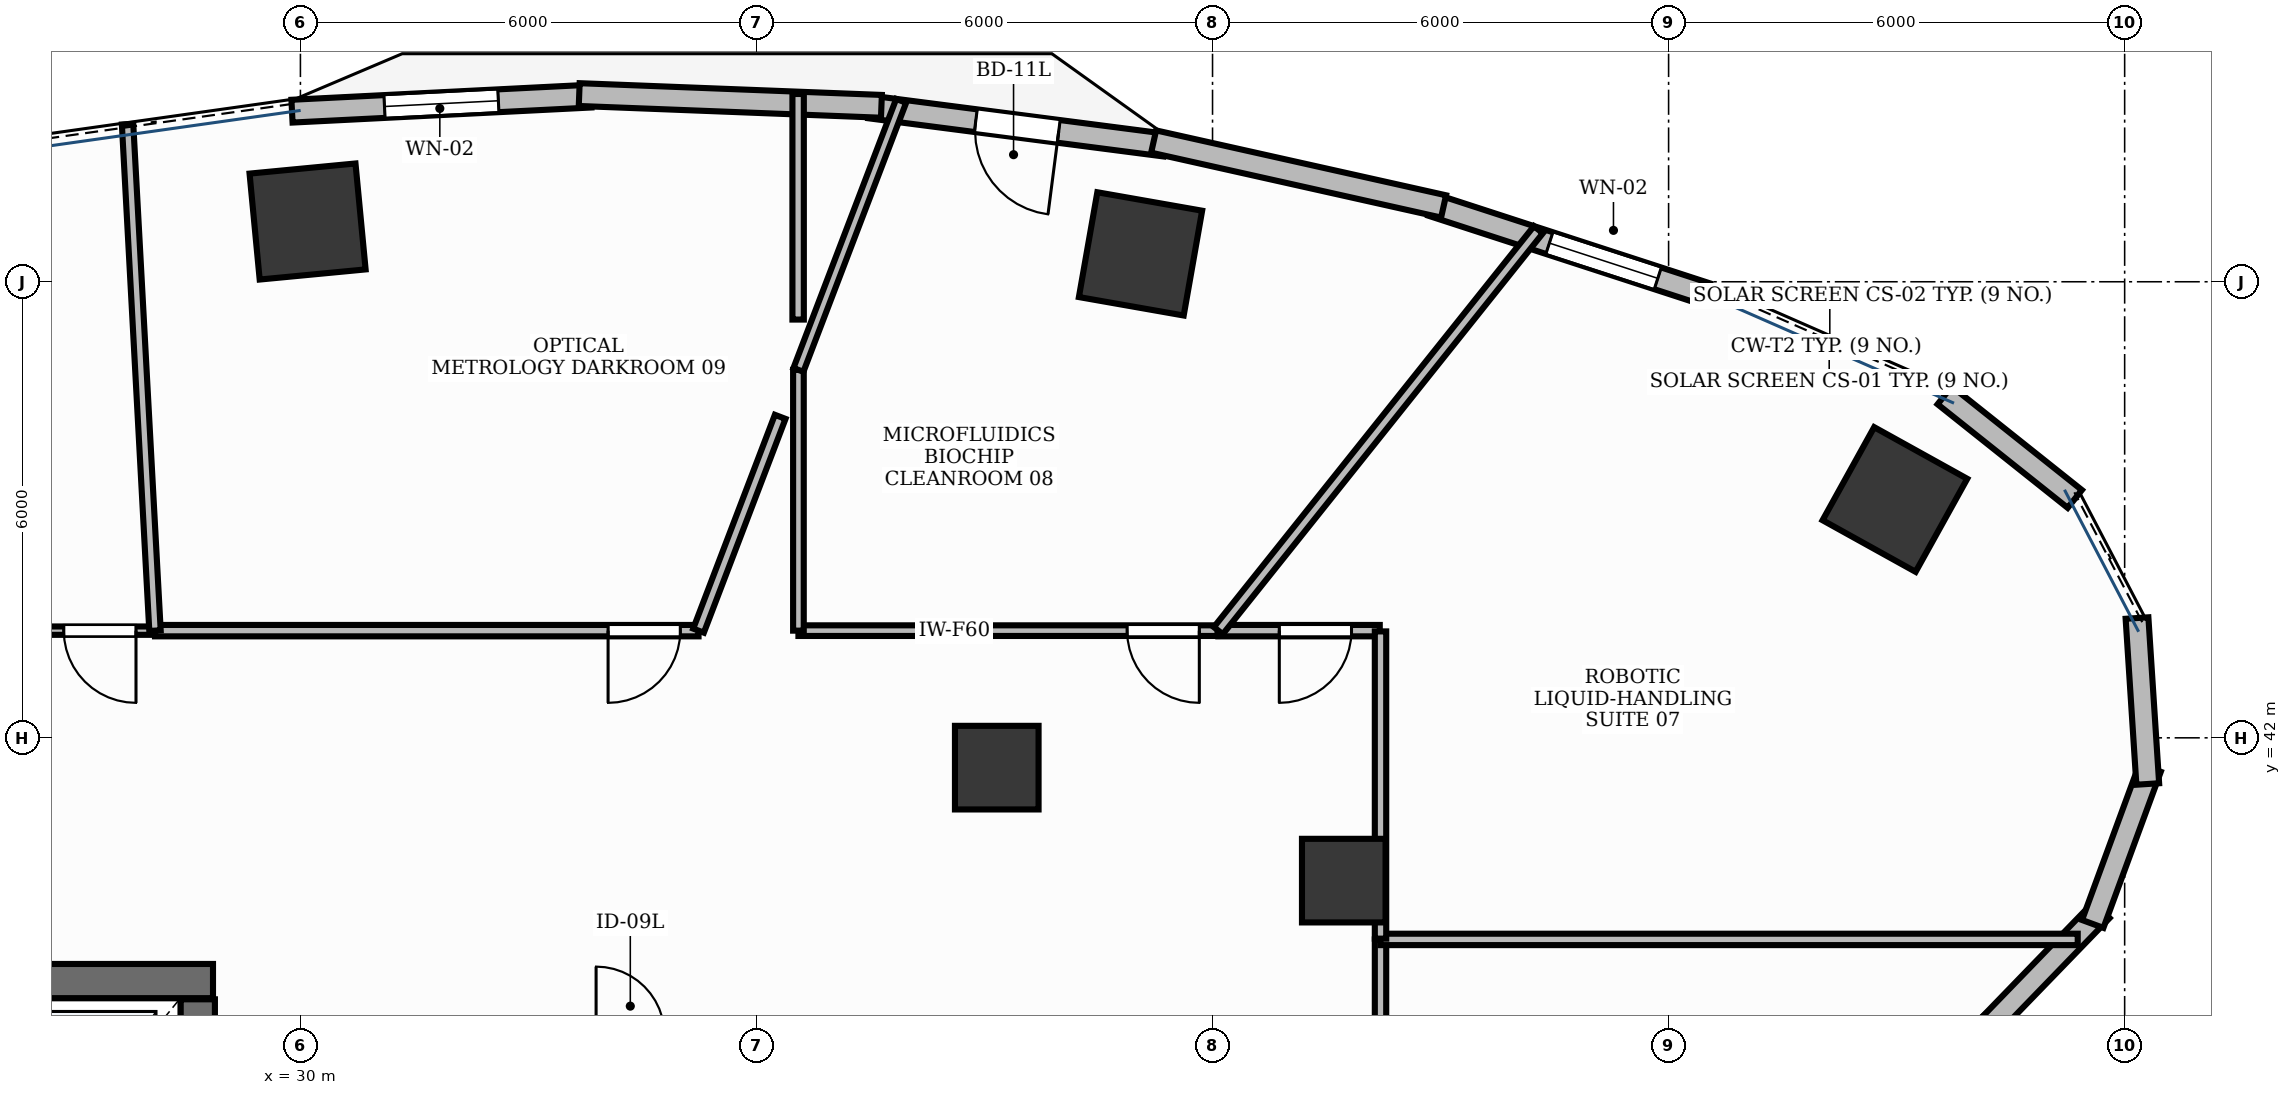
"""IFC4 building model, lengths in metres.
Left out: names, types, materials, properties, quantities, classifications, styles, units other than length and angle.
Written with IfcOpenShell. Run it as: python <this file> out.ifc"""

import sys

from ifc_helpers import new_model, si_unit, direction, frame, frame_2d, origin, origin_2d, place, context, subcontext, project, spatial, rectangle, extrude, element, fill, save


model = new_model("IFC4")
c1 = context("Model", 3, precision=1e-05, world=origin(), true_north=direction((0.0, 1.0)))
c2 = subcontext(c1, "Body", "Model", "MODEL_VIEW")
j1 = project(units=[si_unit("LENGTHUNIT", "METRE"), si_unit("PLANEANGLEUNIT", "RADIAN")], contexts=[c1])
p1 = place(None, origin())
s1 = spatial("IfcSite", under=j1, at=p1, CompositionType="ELEMENT")
p2 = place(p1, origin())
s2 = spatial("IfcBuilding", under=s1, at=p2, CompositionType="ELEMENT")
p3 = place(p2, frame((0.0, 0.0, 46.8)))
s3 = spatial("IfcBuildingStorey", under=s2, at=p3, CompositionType="ELEMENT", Elevation=46.8)
p4 = place(p3, frame((25.75, 38.8, 0.0), z_axis=(0.0, 0.0, 1.0), x_axis=(1.0, 0.0, 0.0)))
e1 = element("IfcWall", 1, at=p4, inside=s3, PredefinedType="SHEAR", context=c2, shape_type="SweptSolid", body=[
    extrude(rectangle(XDim=3.1, YDim=0.45, at=frame_2d((1.55, 0.0))), origin(), (0.0, 0.0, 1.0), 3.9),
])
p5 = place(p3, frame((28.65, 35.86, 0.0), z_axis=(0.0, 0.0, 1.0), x_axis=(0.0, 1.0, 0.0)))
e2 = element("IfcWall", 2, at=p5, inside=s3, PredefinedType="SHEAR", context=c2, shape_type="SweptSolid", body=[
    extrude(rectangle(XDim=2.7, YDim=0.45, at=frame_2d((1.35, 0.0))), origin(), (0.0, 0.0, 1.0), 3.9),
])
p6 = place(p3, frame((50.977, 45.135, -0.0), z_axis=(0.0, 0.0, 1.0), x_axis=(-0.874535078577, 0.484962262797, 0.0)))
e3 = element("IfcColumn", 3, at=p6, inside=s3, PredefinedType="COLUMN", context=c2, shape_type="SweptSolid", body=[
    extrude(rectangle(XDim=1.4, YDim=1.4, at=origin_2d()), origin(), (0.0, 0.0, 1.0), 3.901),
])
p7 = place(p3, frame((43.727, 40.121, -0.0), z_axis=(0.0, 0.0, 1.0), x_axis=(1.0, 0.0, 0.0)))
e4 = element("IfcColumn", 4, at=p7, inside=s3, PredefinedType="COLUMN", context=c2, shape_type="SweptSolid", body=[
    extrude(rectangle(XDim=1.1, YDim=1.1, at=origin_2d()), origin(), (0.0, 0.0, 1.0), 3.901),
])
p8 = place(p3, frame((41.052, 48.367, -0.0), z_axis=(0.0, 0.0, 1.0), x_axis=(-0.984868307662, 0.173304404339, 0.0)))
e5 = element("IfcColumn", 5, at=p8, inside=s3, PredefinedType="COLUMN", context=c2, shape_type="SweptSolid", body=[
    extrude(rectangle(XDim=1.4, YDim=1.4, at=origin_2d()), origin(), (0.0, 0.0, 1.0), 3.901),
])
p9 = place(p3, frame((39.161, 41.608, -0.0), z_axis=(0.0, 0.0, 1.0), x_axis=(1.0, 0.0, 0.0)))
e6 = element("IfcColumn", 6, at=p9, inside=s3, PredefinedType="COLUMN", context=c2, shape_type="SweptSolid", body=[
    extrude(rectangle(XDim=1.1, YDim=1.1, at=origin_2d()), origin(), (0.0, 0.0, 1.0), 3.901),
])
p10 = place(p3, frame((30.094, 48.792, -0.0), z_axis=(0.0, 0.0, 1.0), x_axis=(0.995462868748, 0.095150811579, 0.0)))
e7 = element("IfcColumn", 7, at=p10, inside=s3, PredefinedType="COLUMN", context=c2, shape_type="SweptSolid", body=[
    extrude(rectangle(XDim=1.4, YDim=1.4, at=origin_2d()), origin(), (0.0, 0.0, 1.0), 3.901),
])
p11 = place(p3, frame((48.5, 47.836, 0.0), z_axis=(0.0, 0.0, 1.0), x_axis=(-0.950958033078, 0.30931993037, 0.0)))
e8 = element("IfcWall", 8, at=p11, inside=s3, PredefinedType="STANDARD", context=c2, shape_type="SweptSolid", body=[
    extrude(rectangle(XDim=3.8, YDim=0.3, at=frame_2d((1.9, 0.0))), origin(), (0.0, 0.0, 1.0), 3.9),
])
p12 = place(p11, frame((0.675, 0.0, 0.95)))
e9 = element("IfcOpeningElement", 9, at=p12, cuts=e8, PredefinedType="OPENING", context=c2, shape_type="SweptSolid", body=[
    extrude(rectangle(XDim=1.5, YDim=1.8, at=frame_2d((0.75, 0.9))), frame((0.0, 0.165, 0.0), z_axis=(0.0, -1.0, 0.0), x_axis=(1.0, 0.0, 0.0)), (0.0, 0.0, 1.0), 0.33),
])
p13 = place(p3, frame((41.373, 49.798, 0.0), z_axis=(0.0, 0.0, 1.0), x_axis=(-0.991741322416, 0.128254237408, 0.0)))
e10 = element("IfcWall", 10, at=p13, inside=s3, PredefinedType="STANDARD", context=c2, shape_type="SweptSolid", body=[
    extrude(rectangle(XDim=3.916, YDim=0.3, at=frame_2d((1.958, 0.0))), origin(), (0.0, 0.0, 1.0), 3.9),
])
p14 = place(p13, frame((1.408, 0.0, 0.0)))
e11 = element("IfcOpeningElement", 11, at=p14, cuts=e10, PredefinedType="OPENING", context=c2, shape_type="SweptSolid", body=[
    extrude(rectangle(XDim=1.1, YDim=2.15, at=frame_2d((0.55, 1.075))), frame((0.0, 0.165, 0.0), z_axis=(0.0, -1.0, 0.0), x_axis=(1.0, 0.0, 0.0)), (0.0, 0.0, 1.0), 0.33),
])
p15 = place(p3, frame((33.821, 50.442, 0.0), z_axis=(0.0, 0.0, 1.0), x_axis=(-0.99873153138, -0.050352042933, 0.0)))
e12 = element("IfcWall", 12, at=p15, inside=s3, PredefinedType="STANDARD", context=c2, shape_type="SweptSolid", body=[
    extrude(rectangle(XDim=3.937, YDim=0.3, at=frame_2d((1.969, 0.0))), origin(), (0.0, 0.0, 1.0), 3.9),
])
p16 = place(p15, frame((1.219, 0.0, 0.95)))
e13 = element("IfcOpeningElement", 13, at=p16, cuts=e12, PredefinedType="OPENING", context=c2, shape_type="SweptSolid", body=[
    extrude(rectangle(XDim=1.5, YDim=1.8, at=frame_2d((0.75, 0.9))), frame((0.0, 0.165, 0.0), z_axis=(0.0, -1.0, 0.0), x_axis=(1.0, 0.0, 0.0)), (0.0, 0.0, 1.0), 0.33),
])
p17 = place(p3, frame((45.04, 48.991, 0.0), z_axis=(0.0, 0.0, 1.0), x_axis=(-0.975868573345, 0.218358713032, 0.0)))
e14 = element("IfcWall", 14, at=p17, inside=s3, PredefinedType="STANDARD", context=c2, shape_type="SweptSolid", body=[
    extrude(rectangle(XDim=3.909, YDim=0.3, at=frame_2d((1.954, 0.0))), origin(), (0.0, 0.0, 1.0), 3.9),
])
p18 = place(p3, frame((37.644, 50.308, 0.0), z_axis=(0.0, 0.0, 1.0), x_axis=(-0.999245411623, 0.038840794937, 0.0)))
e15 = element("IfcWall", 15, at=p18, inside=s3, PredefinedType="STANDARD", context=c2, shape_type="SweptSolid", body=[
    extrude(rectangle(XDim=3.979, YDim=0.3, at=frame_2d((1.989, 0.0))), origin(), (0.0, 0.0, 1.0), 3.9),
])
p19 = place(p3, frame((49.709, 36.029, 0.0), z_axis=(0.0, 0.0, 1.0), x_axis=(0.754746490246, 0.656016566454, 0.0)))
e16 = element("IfcWall", 16, at=p19, inside=s3, PredefinedType="STANDARD", context=c2, shape_type="SweptSolid", body=[
    extrude(rectangle(XDim=3.43, YDim=0.3, at=frame_2d((1.715, 0.0))), origin(), (0.0, 0.0, 1.0), 3.9),
])
p20 = place(p3, frame((52.173, 38.161, 0.0), z_axis=(0.0, 0.0, 1.0), x_axis=(0.695404695719, 0.718618333451, 0.0)))
e17 = element("IfcWall", 17, at=p20, inside=s3, PredefinedType="STANDARD", context=c2, shape_type="SweptSolid", body=[
    extrude(rectangle(XDim=2.188, YDim=0.3, at=frame_2d((1.094, 0.0))), origin(), (0.0, 0.0, 1.0), 3.9),
])
for number, where, z_axis, x_axis in (
    (18, (53.58, 39.552, 0.0), (0.0, 0.0, 1.0), (0.345, 0.939, 0.0)),
    (19, (54.304, 41.393, 0.0), (0.0, 0.0, 1.0), (-0.065, 0.998, 0.0)),
    (20, (53.344, 45.143, 0.0), (0.0, 0.0, 1.0), (-0.782, 0.623, 0.0)),
):
    element("IfcWall", number, at=place(p3, frame(where, z_axis=z_axis, x_axis=x_axis)), inside=s3, PredefinedType="STANDARD", context=c2, shape_type="SweptSolid", body=[
        extrude(rectangle(XDim=2.188, YDim=0.3, at=frame_2d((1.094, 0.0))), origin(), (0.0, 0.0, 1.0), 3.9),
    ])
p21 = place(p3, frame((44.21, 29.53, 0.0), z_axis=(0.0, 0.0, 1.0), x_axis=(0.0, 1.0, 0.0)))
e21 = element("IfcWall", 21, at=p21, inside=s3, PredefinedType="PARTITIONING", context=c2, shape_type="SweptSolid", body=[
    extrude(rectangle(XDim=9.818, YDim=0.15, at=frame_2d((4.909, 0.0))), origin(), (0.0, 0.0, 1.0), 2.91),
])
p22 = place(p21, frame((1.274, 0.0, 0.0)))
e22 = element("IfcOpeningElement", 22, at=p22, cuts=e21, PredefinedType="OPENING", context=c2, shape_type="SweptSolid", body=[
    extrude(rectangle(XDim=0.95, YDim=2.15, at=frame_2d((0.475, 1.075))), frame((0.0, 0.09, 0.0), z_axis=(0.0, -1.0, 0.0), x_axis=(1.0, 0.0, 0.0)), (0.0, 0.0, 1.0), 0.18),
])
p23 = place(p3, frame((44.2, 43.41, 0.0), z_axis=(0.0, 0.0, 1.0), x_axis=(-1.0, 0.0, 0.0)))
e23 = element("IfcWall", 23, at=p23, inside=s3, PredefinedType="PARTITIONING", context=c2, shape_type="SweptSolid", body=[
    extrude(rectangle(XDim=2.124, YDim=0.15, at=frame_2d((1.062, 0.0))), origin(), (0.0, 0.0, 1.0), 2.91),
])
p24 = place(p23, frame((0.372, 0.0, 0.0)))
e24 = element("IfcOpeningElement", 24, at=p24, cuts=e23, PredefinedType="OPENING", context=c2, shape_type="SweptSolid", body=[
    extrude(rectangle(XDim=0.95, YDim=2.15, at=frame_2d((0.475, 1.075))), frame((0.0, 0.09, 0.0), z_axis=(0.0, -1.0, 0.0), x_axis=(1.0, 0.0, 0.0)), (0.0, 0.0, 1.0), 0.18),
])
p25 = place(p3, frame((42.066, 43.41, 0.0), z_axis=(0.0, 0.0, 1.0), x_axis=(-1.0, 0.0, 0.0)))
e25 = element("IfcWall", 25, at=p25, inside=s3, PredefinedType="PARTITIONING", context=c2, shape_type="SweptSolid", body=[
    extrude(rectangle(XDim=5.514, YDim=0.14, at=frame_2d((2.757, 0.0))), origin(), (0.0, 0.0, 1.0), 2.91),
])
p26 = place(p25, frame((0.24, 0.0, 0.0)))
e26 = element("IfcOpeningElement", 26, at=p26, cuts=e25, PredefinedType="OPENING", context=c2, shape_type="SweptSolid", body=[
    extrude(rectangle(XDim=0.95, YDim=2.15, at=frame_2d((0.475, 1.075))), frame((0.0, 0.085, 0.0), z_axis=(0.0, -1.0, 0.0), x_axis=(1.0, 0.0, 0.0)), (0.0, 0.0, 1.0), 0.17),
])
p27 = place(p3, frame((35.238, 43.41, 0.0), z_axis=(0.0, 0.0, 1.0), x_axis=(-1.0, 0.0, 0.0)))
e27 = element("IfcWall", 27, at=p27, inside=s3, PredefinedType="PARTITIONING", context=c2, shape_type="SweptSolid", body=[
    extrude(rectangle(XDim=7.151, YDim=0.15, at=frame_2d((3.575, 0.0))), origin(), (0.0, 0.0, 1.0), 2.91),
])
p28 = place(p27, frame((0.24, 0.0, 0.0)))
e28 = element("IfcOpeningElement", 28, at=p28, cuts=e27, PredefinedType="OPENING", context=c2, shape_type="SweptSolid", body=[
    extrude(rectangle(XDim=0.95, YDim=2.15, at=frame_2d((0.475, 1.075))), frame((0.0, 0.09, 0.0), z_axis=(0.0, -1.0, 0.0), x_axis=(1.0, 0.0, 0.0)), (0.0, 0.0, 1.0), 0.18),
])
p29 = place(p3, frame((28.077, 43.41, 0.0), z_axis=(0.0, 0.0, 1.0), x_axis=(-1.0, 0.0, 0.0)))
e29 = element("IfcWall", 29, at=p29, inside=s3, PredefinedType="MOVABLE", context=c2, shape_type="SweptSolid", body=[
    extrude(rectangle(XDim=12.486, YDim=0.11, at=frame_2d((6.243, 0.0))), origin(), (0.0, 0.0, 1.0), 2.91),
])
p30 = place(p29, frame((0.24, 0.0, 0.0)))
e30 = element("IfcOpeningElement", 30, at=p30, cuts=e29, PredefinedType="OPENING", context=c2, shape_type="SweptSolid", body=[
    extrude(rectangle(XDim=0.95, YDim=2.15, at=frame_2d((0.475, 1.075))), frame((0.0, 0.07, 0.0), z_axis=(0.0, -1.0, 0.0), x_axis=(1.0, 0.0, 0.0)), (0.0, 0.0, 1.0), 0.14),
])
p31 = place(p3, frame((44.21, 39.348, 0.0), z_axis=(0.0, 0.0, 1.0), x_axis=(1.0, 0.0, 0.0)))
e31 = element("IfcWall", 31, at=p31, inside=s3, PredefinedType="PARTITIONING", context=c2, shape_type="SweptSolid", body=[
    extrude(rectangle(XDim=9.173, YDim=0.15, at=frame_2d((4.586, 0.0))), origin(), (0.0, 0.0, 1.0), 2.91),
])
p32 = place(p3, frame((44.21, 39.358, 0.0), z_axis=(0.0, 0.0, 1.0), x_axis=(0.0, 1.0, 0.0)))
e32 = element("IfcWall", 32, at=p32, inside=s3, PredefinedType="PARTITIONING", context=c2, shape_type="SweptSolid", body=[
    extrude(rectangle(XDim=4.042, YDim=0.15, at=frame_2d((2.021, 0.0))), origin(), (0.0, 0.0, 1.0), 2.91),
])
p33 = place(p3, frame((42.076, 43.41, 0.0), z_axis=(0.0, 0.0, 1.0), x_axis=(0.623883060792, 0.781517707066, 0.0)))
e33 = element("IfcWall", 33, at=p33, inside=s3, PredefinedType="PARTITIONING", context=c2, shape_type="SweptSolid", body=[
    extrude(rectangle(XDim=6.75, YDim=0.15, at=frame_2d((3.375, 0.0))), origin(), (0.0, 0.0, 1.0), 2.91),
])
p34 = place(p3, frame((36.552, 43.41, 0.0), z_axis=(0.0, 0.0, 1.0), x_axis=(0.0, 1.0, 0.0)))
e34 = element("IfcWall", 34, at=p34, inside=s3, PredefinedType="PARTITIONING", context=c2, shape_type="SweptSolid", body=[
    extrude(rectangle(XDim=3.43, YDim=0.14, at=frame_2d((1.715, 0.0))), origin(), (0.0, 0.0, 1.0), 2.91),
])
p35 = place(p3, frame((36.552, 46.84, 0.0), z_axis=(0.0, 0.0, 1.0), x_axis=(0.356724060898, 0.934209796767, 0.0)))
e35 = element("IfcWall", 35, at=p35, inside=s3, PredefinedType="PARTITIONING", context=c2, shape_type="SweptSolid", body=[
    extrude(rectangle(XDim=3.789, YDim=0.14, at=frame_2d((1.895, 0.0))), origin(), (0.0, 0.0, 1.0), 2.91),
])
p36 = place(p3, frame((36.548, 50.47, 0.0), z_axis=(0.0, 0.0, 1.0), x_axis=(0.0, -1.0, 0.0)))
e36 = element("IfcWall", 36, at=p36, inside=s3, PredefinedType="PARTITIONING", context=c2, shape_type="SweptSolid", body=[
    extrude(rectangle(XDim=2.968, YDim=0.15, at=frame_2d((1.484, 0.0))), origin(), (0.0, 0.0, 1.0), 2.91),
])
p37 = place(p3, frame((36.312, 46.223, 0.0), z_axis=(0.0, 0.0, 1.0), x_axis=(-0.356750456219, -0.934199717399, 0.0)))
e37 = element("IfcWall", 37, at=p37, inside=s3, PredefinedType="PARTITIONING", context=c2, shape_type="SweptSolid", body=[
    extrude(rectangle(XDim=3.011, YDim=0.15, at=frame_2d((1.506, 0.0))), origin(), (0.0, 0.0, 1.0), 2.91),
])
p38 = place(p3, frame((28.087, 43.41, 0.0), z_axis=(0.0, 0.0, 1.0), x_axis=(-0.054075825804, 0.998536832102, 0.0)))
e38 = element("IfcWall", 38, at=p38, inside=s3, PredefinedType="PARTITIONING", context=c2, shape_type="SweptSolid", body=[
    extrude(rectangle(XDim=6.673, YDim=0.15, at=frame_2d((3.336, 0.0))), origin(), (0.0, 0.0, 1.0), 2.91),
])
p39 = place(p12, origin())
e39 = element("IfcWindow", 39, at=p39, inside=s3, PartitioningType="DOUBLE_PANEL_VERTICAL", PredefinedType="WINDOW", context=c2, shape_type="SweptSolid", body=[
    extrude(rectangle(XDim=1.5, YDim=1.8, at=frame_2d((0.75, 0.9))), frame((0.0, 0.03, 0.0), z_axis=(0.0, -1.0, 0.0), x_axis=(1.0, 0.0, 0.0)), (0.0, 0.0, 1.0), 0.06),
])
fill(e9, e39)
p40 = place(p14, origin())
e40 = element("IfcDoor", 40, at=p40, inside=s3, OperationType="SINGLE_SWING_LEFT", PredefinedType="DOOR", context=c2, shape_type="SweptSolid", body=[
    extrude(rectangle(XDim=1.1, YDim=2.15, at=frame_2d((0.55, 1.075))), frame((0.0, 0.025, 0.0), z_axis=(0.0, -1.0, 0.0), x_axis=(1.0, 0.0, 0.0)), (0.0, 0.0, 1.0), 0.05),
])
fill(e11, e40)
p41 = place(p16, origin())
e41 = element("IfcWindow", 41, at=p41, inside=s3, PartitioningType="DOUBLE_PANEL_VERTICAL", PredefinedType="WINDOW", context=c2, shape_type="SweptSolid", body=[
    extrude(rectangle(XDim=1.5, YDim=1.8, at=frame_2d((0.75, 0.9))), frame((0.0, 0.03, 0.0), z_axis=(0.0, -1.0, 0.0), x_axis=(1.0, 0.0, 0.0)), (0.0, 0.0, 1.0), 0.06),
])
fill(e13, e41)
p42 = place(p24, origin())
e42 = element("IfcDoor", 42, at=p42, inside=s3, OperationType="SINGLE_SWING_RIGHT", PredefinedType="DOOR", context=c2, shape_type="SweptSolid", body=[
    extrude(rectangle(XDim=0.95, YDim=2.15, at=frame_2d((0.475, 1.075))), frame((0.0, 0.025, 0.0), z_axis=(0.0, -1.0, 0.0), x_axis=(1.0, 0.0, 0.0)), (0.0, 0.0, 1.0), 0.05),
])
fill(e24, e42)
p43 = place(p26, origin())
e43 = element("IfcDoor", 43, at=p43, inside=s3, OperationType="SINGLE_SWING_LEFT", PredefinedType="DOOR", context=c2, shape_type="SweptSolid", body=[
    extrude(rectangle(XDim=0.95, YDim=2.15, at=frame_2d((0.475, 1.075))), frame((0.0, 0.025, 0.0), z_axis=(0.0, -1.0, 0.0), x_axis=(1.0, 0.0, 0.0)), (0.0, 0.0, 1.0), 0.05),
])
fill(e26, e43)
p44 = place(p28, origin())
e44 = element("IfcDoor", 44, at=p44, inside=s3, OperationType="SINGLE_SWING_RIGHT", PredefinedType="DOOR", context=c2, shape_type="SweptSolid", body=[
    extrude(rectangle(XDim=0.95, YDim=2.15, at=frame_2d((0.475, 1.075))), frame((0.0, 0.025, 0.0), z_axis=(0.0, -1.0, 0.0), x_axis=(1.0, 0.0, 0.0)), (0.0, 0.0, 1.0), 0.05),
])
fill(e28, e44)
p45 = place(p30, origin())
e45 = element("IfcDoor", 45, at=p45, inside=s3, OperationType="SINGLE_SWING_LEFT", PredefinedType="DOOR", context=c2, shape_type="SweptSolid", body=[
    extrude(rectangle(XDim=0.95, YDim=2.15, at=frame_2d((0.475, 1.075))), frame((0.0, 0.025, 0.0), z_axis=(0.0, -1.0, 0.0), x_axis=(1.0, 0.0, 0.0)), (0.0, 0.0, 1.0), 0.05),
])
fill(e30, e45)
save(model, sys.argv[1])
